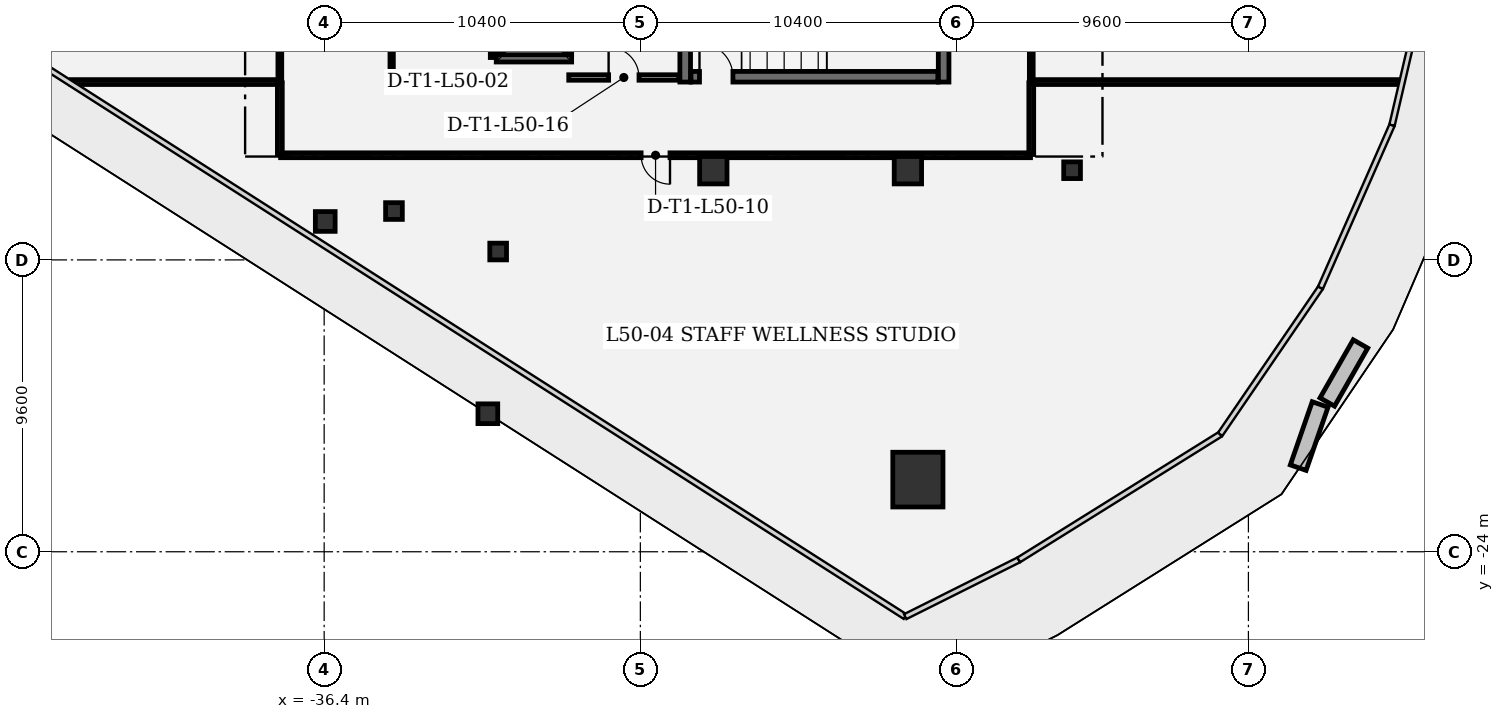
"""IFC4 building model, lengths in metres.
Left out: names, types, materials, properties, quantities, classifications, styles, units other than length and angle.
Written with IfcOpenShell. Run it as: python <this file> out.ifc"""

import sys

from ifc_helpers import new_model, si_unit, direction, frame, frame_2d, origin, origin_2d, place, context, subcontext, project, spatial, rectangle, extrude, element, fill, save


model = new_model("IFC4")
c1 = context("Model", 3, precision=1e-05, world=origin(), true_north=direction((0.0, 1.0)))
c2 = subcontext(c1, "Body", "Model", "MODEL_VIEW")
j1 = project(units=[si_unit("LENGTHUNIT", "METRE"), si_unit("PLANEANGLEUNIT", "RADIAN")], contexts=[c1])
p1 = place(None, origin())
s1 = spatial("IfcSite", under=j1, at=p1, CompositionType="ELEMENT")
p2 = place(p1, origin())
s2 = spatial("IfcBuilding", under=s1, at=p2, CompositionType="ELEMENT")
p3 = place(p2, frame((0.0, 0.0, 217.2)))
s3 = spatial("IfcBuildingStorey", under=s2, at=p3, CompositionType="ELEMENT", Elevation=217.2)
p4 = place(p3, frame((-16.872, -21.627, 0.0), z_axis=(0.0, 0.0, 1.0), x_axis=(1.0, 0.0, 0.0)))
e1 = element("IfcColumn", 1, at=p4, inside=s3, PredefinedType="COLUMN", context=c2, shape_type="SweptSolid", body=[
    extrude(rectangle(XDim=1.65, YDim=1.8, at=origin_2d()), origin(), (0.0, 0.0, 1.0), 4.05),
])
for number, where, z_axis, x_axis in (
    (2, (-17.2, -11.45, 0.0), (0.0, 0.0, 1.0), (1.0, 0.0, 0.0)),
    (3, (-23.6, -11.45, 0.0), (0.0, 0.0, 1.0), (1.0, 0.0, 0.0)),
):
    element("IfcColumn", number, at=place(p3, frame(where, z_axis=z_axis, x_axis=x_axis)), inside=s3, PredefinedType="COLUMN", context=c2, shape_type="SweptSolid", body=[
        extrude(rectangle(XDim=0.9, YDim=0.9, at=origin_2d()), origin(), (0.0, 0.0, 1.0), 4.05),
    ])
for number, where, z_axis, x_axis in (
    (4, (-31.016, -19.46, 0.0), (0.0, 0.0, 1.0), (1.0, 0.0, 0.0)),
    (5, (-36.365, -13.135, 0.0), (0.0, 0.0, 1.0), (1.0, 0.0, 0.0)),
):
    element("IfcColumn", number, at=place(p3, frame(where, z_axis=z_axis, x_axis=x_axis)), inside=s3, PredefinedType="COLUMN", context=c2, shape_type="SweptSolid", body=[
        extrude(rectangle(XDim=0.65, YDim=0.65, at=origin_2d()), origin(), (0.0, 0.0, 1.0), 4.05),
    ])
for number, where, z_axis, x_axis in (
    (6, (-34.104, -12.792, 0.0), (0.0, 0.0, 1.0), (1.0, 0.0, 0.0)),
    (7, (-30.677, -14.124, 0.0), (0.0, 0.0, 1.0), (1.0, 0.0, 0.0)),
    (8, (-11.8, -11.45, 0.0), (0.0, 0.0, 1.0), (1.0, 0.0, 0.0)),
):
    element("IfcColumn", number, at=place(p3, frame(where, z_axis=z_axis, x_axis=x_axis)), inside=s3, PredefinedType="COLUMN", context=c2, shape_type="SweptSolid", body=[
        extrude(rectangle(XDim=0.55, YDim=0.55, at=origin_2d()), origin(), (0.0, 0.0, 1.0), 4.05),
    ])
p5 = place(p3, frame((-24.525, -3.94, 0.0), z_axis=(0.0, 0.0, 1.0), x_axis=(0.0, -1.0, 0.0)))
e9 = element("IfcWall", 9, at=p5, inside=s3, PredefinedType="SHEAR", context=c2, shape_type="SweptSolid", body=[
    extrude(rectangle(XDim=4.61, YDim=0.35, at=frame_2d((2.305, 0.0))), origin(), (0.0, 0.0, 1.0), 3.78),
])
p6 = place(p3, frame((-16.025, -8.55, 0.0), z_axis=(0.0, 0.0, 1.0), x_axis=(0.0, 1.0, 0.0)))
e10 = element("IfcWall", 10, at=p6, inside=s3, PredefinedType="SHEAR", context=c2, shape_type="SweptSolid", body=[
    extrude(rectangle(XDim=4.21, YDim=0.35, at=frame_2d((2.105, 0.0))), origin(), (0.0, 0.0, 1.0), 3.78),
])
p7 = place(p3, frame((-24.335, -8.375, 0.0), z_axis=(0.0, 0.0, 1.0), x_axis=(1.0, 0.0, 0.0)))
e11 = element("IfcWall", 11, at=p7, inside=s3, PredefinedType="SHEAR", context=c2, shape_type="SweptSolid", body=[
    extrude(rectangle(XDim=8.12, YDim=0.35, at=frame_2d((4.06, 0.0))), origin(), (0.0, 0.0, 1.0), 3.78),
])
p8 = place(p7, frame((0.28, 0.0, 0.0)))
e12 = element("IfcOpeningElement", 12, at=p8, cuts=e11, PredefinedType="OPENING", context=c2, shape_type="SweptSolid", body=[
    extrude(rectangle(XDim=1.1, YDim=2.2, at=frame_2d((0.55, 1.1))), frame((0.0, 0.185, 0.0), z_axis=(0.0, -1.0, 0.0), x_axis=(1.0, 0.0, 0.0)), (0.0, 0.0, 1.0), 0.37),
])
p9 = place(p3, frame((-28.26, -7.77, 0.0), z_axis=(0.0, 0.0, 1.0), x_axis=(-1.0, 0.0, 0.0)))
e13 = element("IfcWall", 13, at=p9, inside=s3, PredefinedType="SHEAR", context=c2, shape_type="SweptSolid", body=[
    extrude(rectangle(XDim=2.48, YDim=0.24, at=frame_2d((1.24, 0.0))), origin(), (0.0, 0.0, 1.0), 3.78),
])
p10 = place(p3, frame((-30.62, -7.638, 0.0), z_axis=(0.0, 0.0, 1.0), x_axis=(0.0, 1.0, 0.0)))
e14 = element("IfcWall", 14, at=p10, inside=s3, PredefinedType="SHEAR", context=c2, shape_type="SweptSolid", body=[
    extrude(rectangle(XDim=2.376, YDim=0.24, at=frame_2d((1.188, 0.0))), origin(), (0.0, 0.0, 1.0), 3.78),
])
p11 = place(p3, frame((-28.38, -5.262, 0.0), z_axis=(0.0, 0.0, 1.0), x_axis=(0.0, -1.0, 0.0)))
e15 = element("IfcWall", 15, at=p11, inside=s3, PredefinedType="SHEAR", context=c2, shape_type="SweptSolid", body=[
    extrude(rectangle(XDim=2.376, YDim=0.24, at=frame_2d((1.188, 0.0))), origin(), (0.0, 0.0, 1.0), 3.78),
])
p12 = place(p11, frame((0.538, 0.0, 0.0)))
e16 = element("IfcOpeningElement", 16, at=p12, cuts=e15, PredefinedType="OPENING", context=c2, shape_type="SweptSolid", body=[
    extrude(rectangle(XDim=1.3, YDim=2.3, at=frame_2d((0.65, 1.15))), frame((0.0, 0.13, 0.0), z_axis=(0.0, -1.0, 0.0), x_axis=(1.0, 0.0, 0.0)), (0.0, 0.0, 1.0), 0.26),
])
p13 = place(p3, frame((-28.355, -8.4, 0.0), z_axis=(0.0, 0.0, 1.0), x_axis=(1.0, 0.0, 0.0)))
e17 = element("IfcWall", 17, at=p13, inside=s3, PredefinedType="PARTITIONING", context=c2, shape_type="SweptSolid", body=[
    extrude(rectangle(XDim=3.622, YDim=0.18, at=frame_2d((1.811, 0.0))), origin(), (0.0, 0.0, 1.0), 3.78),
])
p14 = place(p13, frame((1.311, 0.0, 0.0)))
e18 = element("IfcOpeningElement", 18, at=p14, cuts=e17, PredefinedType="OPENING", context=c2, shape_type="SweptSolid", body=[
    extrude(rectangle(XDim=1.0, YDim=2.15, at=frame_2d((0.5, 1.075))), frame((0.0, 0.1, 0.0), z_axis=(0.0, -1.0, 0.0), x_axis=(1.0, 0.0, 0.0)), (0.0, 0.0, 1.0), 0.2),
])
p15 = place(p3, frame((-34.155, -8.35, 0.0), z_axis=(0.0, 0.0, 1.0), x_axis=(1.0, 0.0, 0.0)))
e19 = element("IfcWall", 19, at=p15, inside=s3, PredefinedType="PARTITIONING", context=c2, shape_type="SweptSolid", body=[
    extrude(rectangle(XDim=3.25, YDim=0.11, at=frame_2d((1.625, 0.0))), origin(), (0.0, 0.0, 1.0), 3.344),
])
p16 = place(p3, frame((-30.88, -7.743, 0.0), z_axis=(0.0, 0.0, 1.0), x_axis=(0.0, 1.0, 0.0)))
e20 = element("IfcWall", 20, at=p16, inside=s3, PredefinedType="PARTITIONING", context=c2, shape_type="SweptSolid", body=[
    extrude(rectangle(XDim=2.078, YDim=0.11, at=frame_2d((1.039, 0.0))), origin(), (0.0, 0.0, 1.0), 3.78),
])
p17 = place(p3, frame((-34.18, -5.075, 0.0), z_axis=(0.0, 0.0, 1.0), x_axis=(0.0, -1.0, 0.0)))
e21 = element("IfcWall", 21, at=p17, inside=s3, PredefinedType="PARTITIONING", context=c2, shape_type="SweptSolid", body=[
    extrude(rectangle(XDim=3.25, YDim=0.11, at=frame_2d((1.625, 0.0))), origin(), (0.0, 0.0, 1.0), 3.78),
])
p18 = place(p17, frame((1.185, 0.0, 0.0)))
e22 = element("IfcOpeningElement", 22, at=p18, cuts=e21, PredefinedType="OPENING", context=c2, shape_type="SweptSolid", body=[
    extrude(rectangle(XDim=0.88, YDim=2.1, at=frame_2d((0.44, 1.05))), frame((0.0, 0.065, 0.0), z_axis=(0.0, -1.0, 0.0), x_axis=(1.0, 0.0, 0.0)), (0.0, 0.0, 1.0), 0.13),
])
p19 = place(p3, frame((-1.026, -8.55, 0.0), z_axis=(0.0, 0.0, 1.0), x_axis=(-1.0, 0.0, 0.0)))
e23 = element("IfcWall", 23, at=p19, inside=s3, PredefinedType="PARTITIONING", context=c2, shape_type="SweptSolid", body=[
    extrude(rectangle(XDim=12.091, YDim=0.16, at=frame_2d((6.045, 0.0))), origin(), (0.0, 0.0, 1.0), 3.344),
])
p20 = place(p3, frame((-13.142, -10.933, 0.0), z_axis=(0.0, 0.0, 1.0), x_axis=(0.0, 1.0, 0.0)))
e24 = element("IfcWall", 24, at=p20, inside=s3, PredefinedType="PARTITIONING", context=c2, shape_type="SweptSolid", body=[
    extrude(rectangle(XDim=2.358, YDim=0.16, at=frame_2d((1.179, 0.0))), origin(), (0.0, 0.0, 1.0), 3.0),
])
p21 = place(p3, frame((-13.167, -10.958, 0.0), z_axis=(0.0, 0.0, 1.0), x_axis=(-1.0, 0.0, 0.0)))
e25 = element("IfcWall", 25, at=p21, inside=s3, PredefinedType="PARTITIONING", context=c2, shape_type="SweptSolid", body=[
    extrude(rectangle(XDim=24.666, YDim=0.16, at=frame_2d((12.333, 0.0))), origin(), (0.0, 0.0, 1.0), 3.0),
])
p22 = place(p21, frame((11.858, 0.0, 0.0)))
e26 = element("IfcOpeningElement", 26, at=p22, cuts=e25, PredefinedType="OPENING", context=c2, shape_type="SweptSolid", body=[
    extrude(rectangle(XDim=0.95, YDim=2.15, at=frame_2d((0.475, 1.075))), frame((0.0, 0.09, 0.0), z_axis=(0.0, -1.0, 0.0), x_axis=(1.0, 0.0, 0.0)), (0.0, 0.0, 1.0), 0.18),
])
p23 = place(p3, frame((-37.858, -8.575, 0.0), z_axis=(0.0, 0.0, 1.0), x_axis=(0.0, -1.0, 0.0)))
e27 = element("IfcWall", 27, at=p23, inside=s3, PredefinedType="PARTITIONING", context=c2, shape_type="SweptSolid", body=[
    extrude(rectangle(XDim=2.358, YDim=0.16, at=frame_2d((1.179, 0.0))), origin(), (0.0, 0.0, 1.0), 3.78),
])
p24 = place(p3, frame((-37.883, -8.55, 0.0), z_axis=(0.0, 0.0, 1.0), x_axis=(-1.0, 0.0, 0.0)))
e28 = element("IfcWall", 28, at=p24, inside=s3, PredefinedType="PARTITIONING", context=c2, shape_type="SweptSolid", body=[
    extrude(rectangle(XDim=6.839, YDim=0.16, at=frame_2d((3.419, 0.0))), origin(), (0.0, 0.0, 1.0), 3.0),
])
p25 = place(p3, frame((-13.142, -1.333, 0.0), z_axis=(0.0, 0.0, 1.0), x_axis=(0.0, -1.0, 0.0)))
e29 = element("IfcWall", 29, at=p25, inside=s3, PredefinedType="PARTITIONING", context=c2, shape_type="SweptSolid", body=[
    extrude(rectangle(XDim=7.184, YDim=0.125, at=frame_2d((3.592, 0.0))), origin(), (0.0, 0.0, 1.0), 3.0),
])
p26 = place(p3, frame((-37.858, -8.517, 0.0), z_axis=(0.0, 0.0, 1.0), x_axis=(0.0, 1.0, 0.0)))
e30 = element("IfcWall", 30, at=p26, inside=s3, PredefinedType="PARTITIONING", context=c2, shape_type="SweptSolid", body=[
    extrude(rectangle(XDim=3.734, YDim=0.125, at=frame_2d((1.867, 0.0))), origin(), (0.0, 0.0, 1.0), 3.78),
])
p27 = place(p26, frame((1.392, 0.0, 0.0)))
e31 = element("IfcOpeningElement", 31, at=p27, cuts=e30, PredefinedType="OPENING", context=c2, shape_type="SweptSolid", body=[
    extrude(rectangle(XDim=0.95, YDim=2.15, at=frame_2d((0.475, 1.075))), frame((0.0, 0.073, 0.0), z_axis=(0.0, -1.0, 0.0), x_axis=(1.0, 0.0, 0.0)), (0.0, 0.0, 1.0), 0.145),
])
p28 = place(p8, origin())
e32 = element("IfcDoor", 32, at=p28, inside=s3, OperationType="SINGLE_SWING_LEFT", PredefinedType="DOOR", context=c2, shape_type="SweptSolid", body=[
    extrude(rectangle(XDim=1.1, YDim=2.2, at=frame_2d((0.55, 1.1))), frame((0.0, 0.025, 0.0), z_axis=(0.0, -1.0, 0.0), x_axis=(1.0, 0.0, 0.0)), (0.0, 0.0, 1.0), 0.05),
])
fill(e12, e32)
p29 = place(p22, origin())
e33 = element("IfcDoor", 33, at=p29, inside=s3, OperationType="SINGLE_SWING_LEFT", PredefinedType="DOOR", context=c2, shape_type="SweptSolid", body=[
    extrude(rectangle(XDim=0.95, YDim=2.15, at=frame_2d((0.475, 1.075))), frame((0.0, 0.025, 0.0), z_axis=(0.0, -1.0, 0.0), x_axis=(1.0, 0.0, 0.0)), (0.0, 0.0, 1.0), 0.05),
])
fill(e26, e33)
p30 = place(p14, origin())
e34 = element("IfcDoor", 34, at=p30, inside=s3, OperationType="SINGLE_SWING_LEFT", PredefinedType="DOOR", context=c2, shape_type="SweptSolid", body=[
    extrude(rectangle(XDim=1.0, YDim=2.15, at=frame_2d((0.5, 1.075))), frame((0.0, 0.025, 0.0), z_axis=(0.0, -1.0, 0.0), x_axis=(1.0, 0.0, 0.0)), (0.0, 0.0, 1.0), 0.05),
])
fill(e18, e34)
save(model, sys.argv[1])
